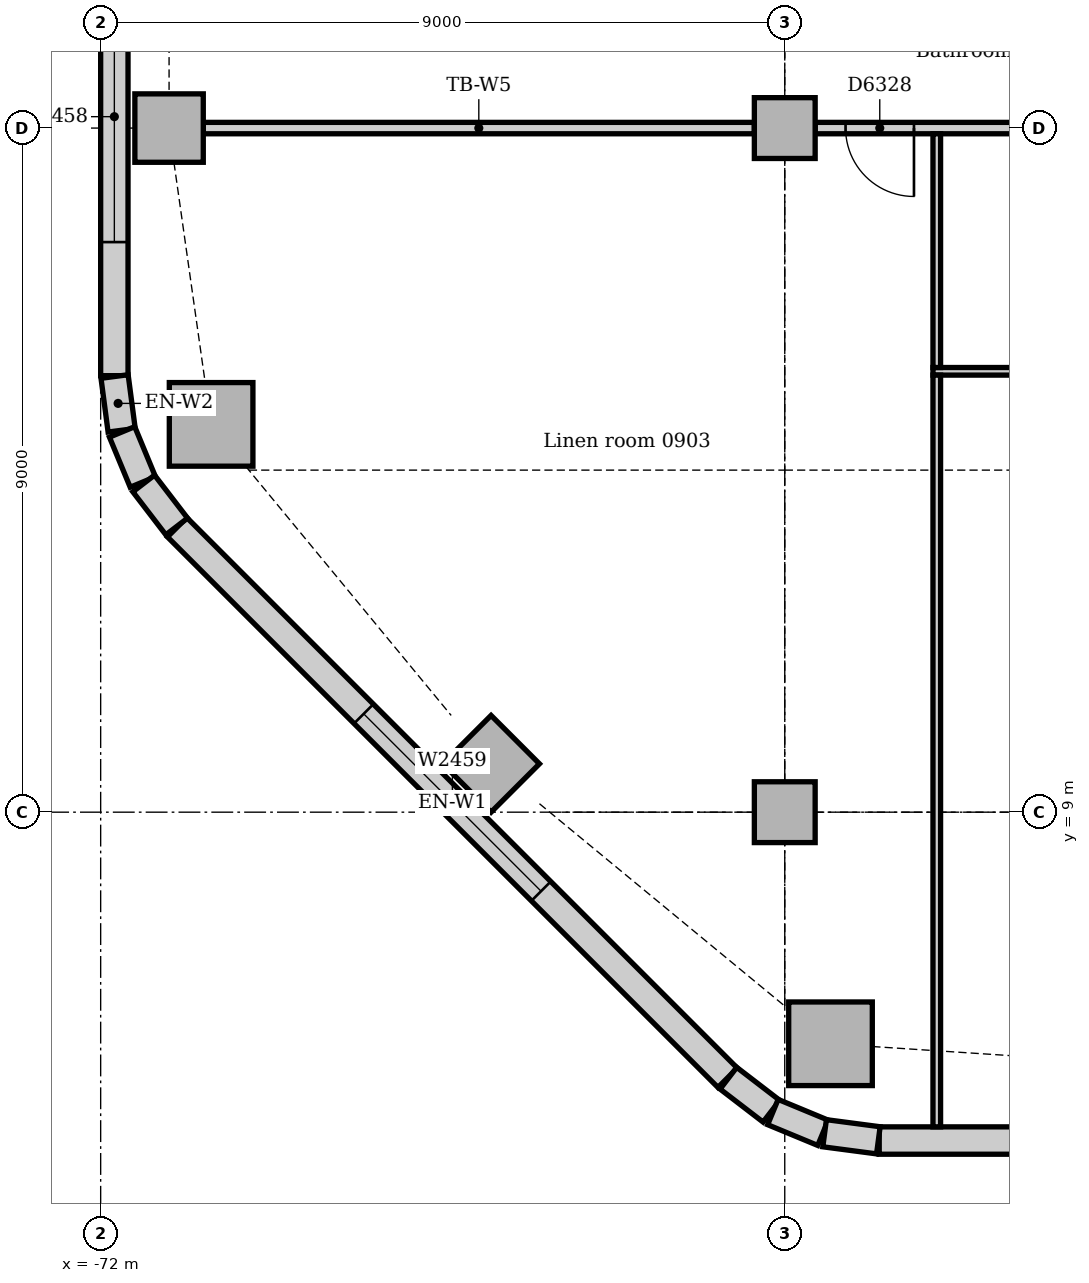
"""IFC4 building model, lengths in metres.
Left out: names, types, materials, properties, quantities, classifications, styles, units other than length and angle.
Written with IfcOpenShell. Run it as: python <this file> out.ifc"""

import sys

from ifc_helpers import new_model, si_unit, direction, frame, frame_2d, origin, origin_2d, place, context, subcontext, project, spatial, rectangle, extrude, element, fill, save


model = new_model("IFC4")
c1 = context("Model", 3, precision=1e-05, world=origin(), true_north=direction((0.0, 1.0)))
c2 = subcontext(c1, "Body", "Model", "MODEL_VIEW")
j1 = project(units=[si_unit("LENGTHUNIT", "METRE"), si_unit("PLANEANGLEUNIT", "RADIAN")], contexts=[c1])
p1 = place(None, origin())
s1 = spatial("IfcSite", under=j1, at=p1, CompositionType="ELEMENT")
p2 = place(p1, origin())
s2 = spatial("IfcBuilding", under=s1, at=p2, CompositionType="ELEMENT")
p3 = place(p2, frame((0.0, 0.0, 42.0)))
s3 = spatial("IfcBuildingStorey", under=s2, at=p3, CompositionType="ELEMENT", Elevation=42.0)
for number, where, z_axis, x_axis in (
    (1, (-62.398, 5.953, 0.0), (0.0, 0.0, 1.0), (1.0, 0.0, 0.0)),
    (2, (-70.547, 14.102, 0.0), (0.0, 0.0, 1.0), (1.0, 0.0, 0.0)),
):
    element("IfcColumn", number, at=place(p3, frame(where, z_axis=z_axis, x_axis=x_axis)), inside=s3, PredefinedType="COLUMN", context=c2, shape_type="SweptSolid", body=[
        extrude(rectangle(XDim=1.1, YDim=1.1, at=origin_2d()), origin(), (0.0, 0.0, 1.0), 3.7),
    ])
for number, where, z_axis, x_axis in (
    (3, (-71.1, 18.0, 0.0), (0.0, 0.0, 1.0), (1.0, 0.0, 0.0)),
    (4, (-66.864, 9.636, 0.0), (0.0, 0.0, 1.0), (0.707, 0.707, 0.0)),
):
    element("IfcColumn", number, at=place(p3, frame(where, z_axis=z_axis, x_axis=x_axis)), inside=s3, PredefinedType="COLUMN", context=c2, shape_type="SweptSolid", body=[
        extrude(rectangle(XDim=0.9, YDim=0.9, at=origin_2d()), origin(), (0.0, 0.0, 1.0), 3.7),
    ])
for number, where, z_axis, x_axis in (
    (5, (-63.0, 9.0, 0.0), (0.0, 0.0, 1.0), (1.0, 0.0, 0.0)),
    (6, (-63.0, 18.0, 0.0), (0.0, 0.0, 1.0), (1.0, 0.0, 0.0)),
):
    element("IfcColumn", number, at=place(p3, frame(where, z_axis=z_axis, x_axis=x_axis)), inside=s3, PredefinedType="COLUMN", context=c2, shape_type="SweptSolid", body=[
        extrude(rectangle(XDim=0.8, YDim=0.8, at=origin_2d()), origin(), (0.0, 0.0, 1.0), 3.7),
    ])
p4 = place(p3, frame((-61.757, 4.68, 0.0), z_axis=(0.0, 0.0, 1.0), x_axis=(1.0, 0.0, 0.0)))
e7 = element("IfcWall", 7, at=p4, inside=s3, PredefinedType="STANDARD", context=c2, shape_type="SweptSolid", body=[
    extrude(rectangle(XDim=30.515, YDim=0.36, at=frame_2d((15.257, 0.0))), origin(), (0.0, 0.0, 1.0), 3.7),
])
p5 = place(p4, frame((2.357, 0.0, 0.9)))
e8 = element("IfcOpeningElement", 8, at=p5, cuts=e7, PredefinedType="OPENING", context=c2, shape_type="SweptSolid", body=[
    extrude(rectangle(XDim=3.3, YDim=1.6, at=frame_2d((1.65, 0.8))), frame((0.0, 0.19, 0.0), z_axis=(0.0, -1.0, 0.0), x_axis=(1.0, 0.0, 0.0)), (0.0, 0.0, 1.0), 0.38),
])
p6 = place(p4, frame((6.857, 0.0, 0.9)))
e9 = element("IfcOpeningElement", 9, at=p6, cuts=e7, PredefinedType="OPENING", context=c2, shape_type="SweptSolid", body=[
    extrude(rectangle(XDim=3.3, YDim=1.6, at=frame_2d((1.65, 0.8))), frame((0.0, 0.19, 0.0), z_axis=(0.0, -1.0, 0.0), x_axis=(1.0, 0.0, 0.0)), (0.0, 0.0, 1.0), 0.38),
])
p7 = place(p4, frame((11.357, 0.0, 0.9)))
e10 = element("IfcOpeningElement", 10, at=p7, cuts=e7, PredefinedType="OPENING", context=c2, shape_type="SweptSolid", body=[
    extrude(rectangle(XDim=3.3, YDim=1.6, at=frame_2d((1.65, 0.8))), frame((0.0, 0.19, 0.0), z_axis=(0.0, -1.0, 0.0), x_axis=(1.0, 0.0, 0.0)), (0.0, 0.0, 1.0), 0.38),
])
p8 = place(p4, frame((15.857, 0.0, 0.9)))
e11 = element("IfcOpeningElement", 11, at=p8, cuts=e7, PredefinedType="OPENING", context=c2, shape_type="SweptSolid", body=[
    extrude(rectangle(XDim=3.3, YDim=1.6, at=frame_2d((1.65, 0.8))), frame((0.0, 0.19, 0.0), z_axis=(0.0, -1.0, 0.0), x_axis=(1.0, 0.0, 0.0)), (0.0, 0.0, 1.0), 0.38),
])
p9 = place(p4, frame((20.357, 0.0, 0.9)))
e12 = element("IfcOpeningElement", 12, at=p9, cuts=e7, PredefinedType="OPENING", context=c2, shape_type="SweptSolid", body=[
    extrude(rectangle(XDim=3.3, YDim=1.6, at=frame_2d((1.65, 0.8))), frame((0.0, 0.19, 0.0), z_axis=(0.0, -1.0, 0.0), x_axis=(1.0, 0.0, 0.0)), (0.0, 0.0, 1.0), 0.38),
])
p10 = place(p4, frame((24.857, 0.0, 0.9)))
e13 = element("IfcOpeningElement", 13, at=p10, cuts=e7, PredefinedType="OPENING", context=c2, shape_type="SweptSolid", body=[
    extrude(rectangle(XDim=3.3, YDim=1.6, at=frame_2d((1.65, 0.8))), frame((0.0, 0.19, 0.0), z_axis=(0.0, -1.0, 0.0), x_axis=(1.0, 0.0, 0.0)), (0.0, 0.0, 1.0), 0.38),
])
p11 = place(p3, frame((-71.82, 40.757, 0.0), z_axis=(0.0, 0.0, 1.0), x_axis=(0.0, -1.0, 0.0)))
e14 = element("IfcWall", 14, at=p11, inside=s3, PredefinedType="STANDARD", context=c2, shape_type="SweptSolid", body=[
    extrude(rectangle(XDim=26.015, YDim=0.36, at=frame_2d((13.007, 0.0))), origin(), (0.0, 0.0, 1.0), 3.7),
])
p12 = place(p11, frame((2.357, 0.0, 0.9)))
e15 = element("IfcOpeningElement", 15, at=p12, cuts=e14, PredefinedType="OPENING", context=c2, shape_type="SweptSolid", body=[
    extrude(rectangle(XDim=3.3, YDim=1.6, at=frame_2d((1.65, 0.8))), frame((0.0, 0.19, 0.0), z_axis=(0.0, -1.0, 0.0), x_axis=(1.0, 0.0, 0.0)), (0.0, 0.0, 1.0), 0.38),
])
p13 = place(p11, frame((7.057, 0.0, 0.9)))
e16 = element("IfcOpeningElement", 16, at=p13, cuts=e14, PredefinedType="OPENING", context=c2, shape_type="SweptSolid", body=[
    extrude(rectangle(XDim=3.3, YDim=1.6, at=frame_2d((1.65, 0.8))), frame((0.0, 0.19, 0.0), z_axis=(0.0, -1.0, 0.0), x_axis=(1.0, 0.0, 0.0)), (0.0, 0.0, 1.0), 0.38),
])
p14 = place(p11, frame((11.357, 0.0, 0.9)))
e17 = element("IfcOpeningElement", 17, at=p14, cuts=e14, PredefinedType="OPENING", context=c2, shape_type="SweptSolid", body=[
    extrude(rectangle(XDim=3.3, YDim=1.6, at=frame_2d((1.65, 0.8))), frame((0.0, 0.19, 0.0), z_axis=(0.0, -1.0, 0.0), x_axis=(1.0, 0.0, 0.0)), (0.0, 0.0, 1.0), 0.38),
])
p15 = place(p11, frame((15.857, 0.0, 0.9)))
e18 = element("IfcOpeningElement", 18, at=p15, cuts=e14, PredefinedType="OPENING", context=c2, shape_type="SweptSolid", body=[
    extrude(rectangle(XDim=3.3, YDim=1.6, at=frame_2d((1.65, 0.8))), frame((0.0, 0.19, 0.0), z_axis=(0.0, -1.0, 0.0), x_axis=(1.0, 0.0, 0.0)), (0.0, 0.0, 1.0), 0.38),
])
p16 = place(p11, frame((20.957, 0.0, 0.9)))
e19 = element("IfcOpeningElement", 19, at=p16, cuts=e14, PredefinedType="OPENING", context=c2, shape_type="SweptSolid", body=[
    extrude(rectangle(XDim=3.3, YDim=1.6, at=frame_2d((1.65, 0.8))), frame((0.0, 0.19, 0.0), z_axis=(0.0, -1.0, 0.0), x_axis=(1.0, 0.0, 0.0)), (0.0, 0.0, 1.0), 0.38),
])
p17 = place(p3, frame((-70.994, 12.749, 0.0), z_axis=(0.0, 0.0, 1.0), x_axis=(0.707106781187, -0.707106781187, 0.0)))
e20 = element("IfcWall", 20, at=p17, inside=s3, PredefinedType="STANDARD", context=c2, shape_type="SweptSolid", body=[
    extrude(rectangle(XDim=10.243, YDim=0.36, at=frame_2d((5.121, 0.0))), origin(), (0.0, 0.0, 1.0), 3.7),
])
p18 = place(p17, frame((3.471, 0.0, 0.9)))
e21 = element("IfcOpeningElement", 21, at=p18, cuts=e20, PredefinedType="OPENING", context=c2, shape_type="SweptSolid", body=[
    extrude(rectangle(XDim=3.3, YDim=1.6, at=frame_2d((1.65, 0.8))), frame((0.0, 0.19, 0.0), z_axis=(0.0, -1.0, 0.0), x_axis=(1.0, 0.0, 0.0)), (0.0, 0.0, 1.0), 0.38),
])
for number, where, z_axis, x_axis in (
    (22, (-71.817, 14.731, 0.0), (0.0, 0.0, 1.0), (0.131, -0.991, 0.0)),
    (23, (-71.718, 14.003, 0.0), (0.0, 0.0, 1.0), (0.383, -0.924, 0.0)),
):
    element("IfcWall", number, at=place(p3, frame(where, z_axis=z_axis, x_axis=x_axis)), inside=s3, PredefinedType="STANDARD", context=c2, shape_type="SweptSolid", body=[
        extrude(rectangle(XDim=0.713, YDim=0.36, at=frame_2d((0.356, 0.0))), origin(), (0.0, 0.0, 1.0), 3.7),
    ])
for number, where, z_axis, x_axis in (
    (24, (-71.434, 13.325, 0.0), (0.0, 0.0, 1.0), (0.609, -0.793, 0.0)),
    (25, (-63.741, 5.5, 0.0), (0.0, 0.0, 1.0), (0.793, -0.609, 0.0)),
):
    element("IfcWall", number, at=place(p3, frame(where, z_axis=z_axis, x_axis=x_axis)), inside=s3, PredefinedType="STANDARD", context=c2, shape_type="SweptSolid", body=[
        extrude(rectangle(XDim=0.713, YDim=0.36, at=frame_2d((0.357, 0.0))), origin(), (0.0, 0.0, 1.0), 3.7),
    ])
for number, where, z_axis, x_axis in (
    (26, (-63.156, 5.055, 0.0), (0.0, 0.0, 1.0), (0.924, -0.383, 0.0)),
    (27, (-62.476, 4.776, 0.0), (0.0, 0.0, 1.0), (0.991, -0.131, 0.0)),
):
    element("IfcWall", number, at=place(p3, frame(where, z_axis=z_axis, x_axis=x_axis)), inside=s3, PredefinedType="STANDARD", context=c2, shape_type="SweptSolid", body=[
        extrude(rectangle(XDim=0.713, YDim=0.36, at=frame_2d((0.356, 0.0))), origin(), (0.0, 0.0, 1.0), 3.7),
    ])
p19 = place(p3, frame((-62.6, 18.0, 0.0), z_axis=(0.0, 0.0, 1.0), x_axis=(1.0, 0.0, 0.0)))
e28 = element("IfcWall", 28, at=p19, inside=s3, PredefinedType="PARTITIONING", context=c2, shape_type="SweptSolid", body=[
    extrude(rectangle(XDim=8.2, YDim=0.15, at=frame_2d((4.1, 0.0))), origin(), (0.0, 0.0, 1.0), 3.0),
])
p20 = place(p19, frame((0.4, 0.0, 0.0)))
e29 = element("IfcOpeningElement", 29, at=p20, cuts=e28, PredefinedType="OPENING", context=c2, shape_type="SweptSolid", body=[
    extrude(rectangle(XDim=0.9, YDim=2.1, at=frame_2d((0.45, 1.05))), frame((0.0, 0.085, 0.0), z_axis=(0.0, -1.0, 0.0), x_axis=(1.0, 0.0, 0.0)), (0.0, 0.0, 1.0), 0.17),
])
p21 = place(p19, frame((4.02, 0.0, 0.0)))
e30 = element("IfcOpeningElement", 30, at=p21, cuts=e28, PredefinedType="OPENING", context=c2, shape_type="SweptSolid", body=[
    extrude(rectangle(XDim=1.0, YDim=2.1, at=frame_2d((0.5, 1.05))), frame((0.0, 0.085, 0.0), z_axis=(0.0, -1.0, 0.0), x_axis=(1.0, 0.0, 0.0)), (0.0, 0.0, 1.0), 0.17),
])
p22 = place(p3, frame((-70.65, 18.0, 0.0), z_axis=(0.0, 0.0, 1.0), x_axis=(1.0, 0.0, 0.0)))
e31 = element("IfcWall", 31, at=p22, inside=s3, PredefinedType="PARTITIONING", context=c2, shape_type="SweptSolid", body=[
    extrude(rectangle(XDim=7.25, YDim=0.15, at=frame_2d((3.625, 0.0))), origin(), (0.0, 0.0, 1.0), 3.0),
])
p23 = place(p3, frame((-61.05, 14.8, 0.0), z_axis=(0.0, 0.0, 1.0), x_axis=(1.0, 0.0, 0.0)))
e32 = element("IfcWall", 32, at=p23, inside=s3, PredefinedType="PARTITIONING", context=c2, shape_type="SweptSolid", body=[
    extrude(rectangle(XDim=6.975, YDim=0.1, at=frame_2d((3.487, 0.0))), origin(), (0.0, 0.0, 1.0), 3.7),
])
p24 = place(p23, frame((2.52, 0.0, 0.0)))
e33 = element("IfcOpeningElement", 33, at=p24, cuts=e32, PredefinedType="OPENING", context=c2, shape_type="SweptSolid", body=[
    extrude(rectangle(XDim=0.9, YDim=2.1, at=frame_2d((0.45, 1.05))), frame((0.0, 0.06, 0.0), z_axis=(0.0, -1.0, 0.0), x_axis=(1.0, 0.0, 0.0)), (0.0, 0.0, 1.0), 0.12),
])
p25 = place(p3, frame((-61.0, 14.85, 0.0), z_axis=(0.0, 0.0, 1.0), x_axis=(0.0, 1.0, 0.0)))
e34 = element("IfcWall", 34, at=p25, inside=s3, PredefinedType="PARTITIONING", context=c2, shape_type="SweptSolid", body=[
    extrude(rectangle(XDim=3.075, YDim=0.1, at=frame_2d((1.538, 0.0))), origin(), (0.0, 0.0, 1.0), 3.7),
])
p26 = place(p3, frame((-61.0, 4.86, 0.0), z_axis=(0.0, 0.0, 1.0), x_axis=(0.0, 1.0, 0.0)))
e35 = element("IfcWall", 35, at=p26, inside=s3, PredefinedType="PARTITIONING", context=c2, shape_type="SweptSolid", body=[
    extrude(rectangle(XDim=9.89, YDim=0.1, at=frame_2d((4.945, 0.0))), origin(), (0.0, 0.0, 1.0), 3.7),
])
p27 = place(p16, origin())
e36 = element("IfcWindow", 36, at=p27, inside=s3, PartitioningType="SINGLE_PANEL", PredefinedType="WINDOW", context=c2, shape_type="SweptSolid", body=[
    extrude(rectangle(XDim=3.3, YDim=1.6, at=frame_2d((1.65, 0.8))), frame((0.0, 0.13, 0.0), z_axis=(0.0, -1.0, 0.0), x_axis=(1.0, 0.0, 0.0)), (0.0, 0.0, 1.0), 0.06),
])
fill(e19, e36)
p28 = place(p18, origin())
e37 = element("IfcWindow", 37, at=p28, inside=s3, PartitioningType="SINGLE_PANEL", PredefinedType="WINDOW", context=c2, shape_type="SweptSolid", body=[
    extrude(rectangle(XDim=3.3, YDim=1.6, at=frame_2d((1.65, 0.8))), frame((0.0, 0.13, 0.0), z_axis=(0.0, -1.0, 0.0), x_axis=(1.0, 0.0, 0.0)), (0.0, 0.0, 1.0), 0.06),
])
fill(e21, e37)
p29 = place(p20, frame((0.9, 0.0, 0.0), z_axis=(0.0, 0.0, 1.0), x_axis=(-1.0, 0.0, 0.0)))
e38 = element("IfcDoor", 38, at=p29, inside=s3, OperationType="SINGLE_SWING_LEFT", PredefinedType="DOOR", context=c2, shape_type="SweptSolid", body=[
    extrude(rectangle(XDim=0.9, YDim=2.1, at=frame_2d((0.45, 1.05))), frame((0.0, 0.025, 0.0), z_axis=(0.0, -1.0, 0.0), x_axis=(1.0, 0.0, 0.0)), (0.0, 0.0, 1.0), 0.05),
])
fill(e29, e38)
save(model, sys.argv[1])
